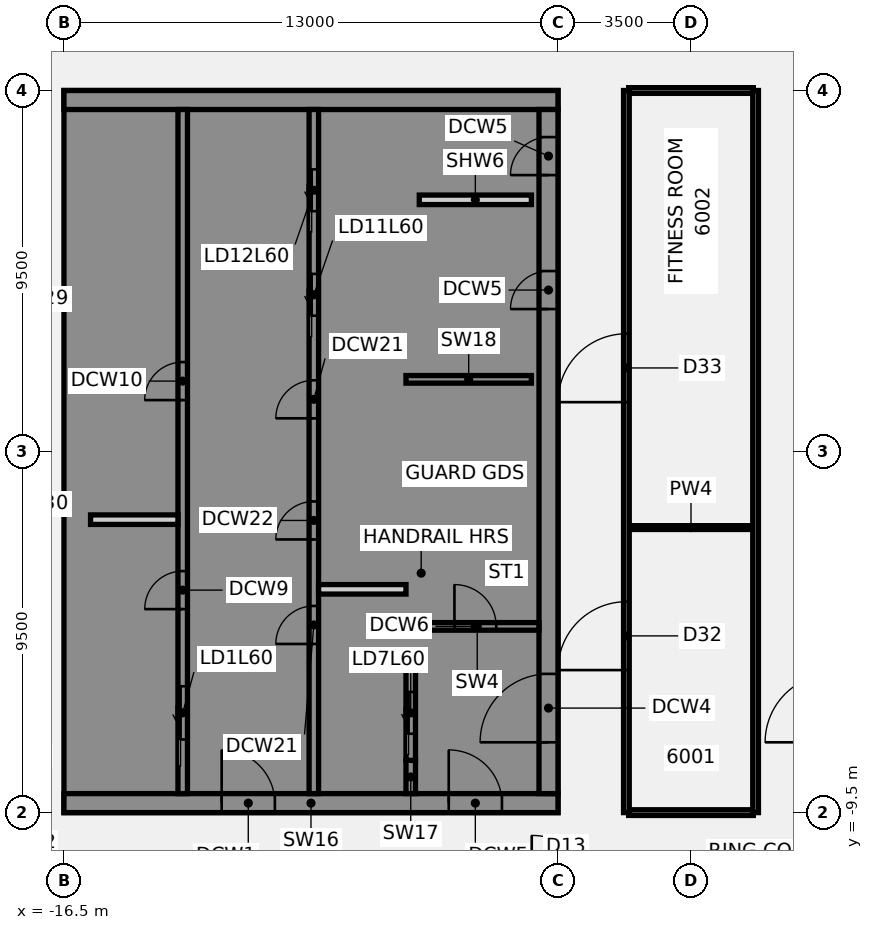
"""IFC4 building model, lengths in metres.
Left out: names, types, materials, properties, quantities, classifications, styles, units other than length and angle.
Written with IfcOpenShell. Run it as: python <this file> out.ifc"""

import sys

from ifc_helpers import new_model, si_unit, direction, frame, frame_2d, origin, place, context, subcontext, project, spatial, polyline, rectangle, outline, extrude, element, fill, save


model = new_model("IFC4")
c1 = context("Model", 3, precision=1e-05, world=origin(), true_north=direction((0.0, 1.0)))
c2 = subcontext(c1, "Body", "Model", "MODEL_VIEW")
j1 = project(units=[si_unit("LENGTHUNIT", "METRE"), si_unit("PLANEANGLEUNIT", "RADIAN")], contexts=[c1])
p1 = place(None, origin())
s1 = spatial("IfcSite", under=j1, at=p1, CompositionType="ELEMENT")
p2 = place(p1, origin())
s2 = spatial("IfcBuilding", under=s1, at=p2, CompositionType="ELEMENT")
p3 = place(p2, frame((0.0, 0.0, 237.9)))
s3 = spatial("IfcBuildingStorey", under=s2, at=p3, CompositionType="ELEMENT", Elevation=237.9)
p4 = place(p3, frame((-1.64, -9.5, 0.0), z_axis=(0.0, 0.0, 1.0), x_axis=(1.0, 0.0, 0.0)))
e1 = element("IfcWall", 1, at=p4, inside=s3, PredefinedType="PARTITIONING", context=c2, shape_type="SweptSolid", body=[
    extrude(rectangle(XDim=3.28, YDim=0.15, at=frame_2d((1.64, 0.0))), origin(), (0.0, 0.0, 1.0), 2.864),
])
p5 = place(p3, frame((-1.64, -2.0, 0.0), z_axis=(0.0, 0.0, 1.0), x_axis=(1.0, 0.0, 0.0)))
e2 = element("IfcWall", 2, at=p5, inside=s3, PredefinedType="PARTITIONING", context=c2, shape_type="SweptSolid", body=[
    extrude(rectangle(XDim=3.28, YDim=0.1, at=frame_2d((1.64, 0.0))), origin(), (0.0, 0.0, 1.0), 2.864),
])
p6 = place(p3, frame((-1.64, 9.5, 0.0), z_axis=(0.0, 0.0, 1.0), x_axis=(1.0, 0.0, 0.0)))
e3 = element("IfcWall", 3, at=p6, inside=s3, PredefinedType="PARTITIONING", context=c2, shape_type="SweptSolid", body=[
    extrude(rectangle(XDim=3.28, YDim=0.15, at=frame_2d((1.64, 0.0))), origin(), (0.0, 0.0, 1.0), 2.864),
])
p7 = place(p3, frame((-1.7, -9.5, 0.0), z_axis=(0.0, 0.0, 1.0), x_axis=(0.0, 1.0, 0.0)))
e4 = element("IfcWall", 4, at=p7, inside=s3, PredefinedType="PARTITIONING", context=c2, shape_type="SweptSolid", body=[
    extrude(rectangle(XDim=19.0, YDim=0.15, at=frame_2d((9.5, 0.0))), origin(), (0.0, 0.0, 1.0), 2.864),
])
p8 = place(p7, frame((3.75, 0.0, 0.0)))
e5 = element("IfcOpeningElement", 5, at=p8, cuts=e4, PredefinedType="OPENING", context=c2, shape_type="SweptSolid", body=[
    extrude(rectangle(XDim=1.8, YDim=2.1, at=frame_2d((0.9, 1.05))), frame((0.0, 0.085, 0.0), z_axis=(0.0, -1.0, 0.0), x_axis=(1.0, 0.0, 0.0)), (0.0, 0.0, 1.0), 0.17),
])
p9 = place(p7, frame((10.8, 0.0, 0.0)))
e6 = element("IfcOpeningElement", 6, at=p9, cuts=e4, PredefinedType="OPENING", context=c2, shape_type="SweptSolid", body=[
    extrude(rectangle(XDim=1.8, YDim=2.1, at=frame_2d((0.9, 1.05))), frame((0.0, 0.085, 0.0), z_axis=(0.0, -1.0, 0.0), x_axis=(1.0, 0.0, 0.0)), (0.0, 0.0, 1.0), 0.17),
])
p10 = place(p3, frame((1.7, -9.5, 0.0), z_axis=(0.0, 0.0, 1.0), x_axis=(0.0, 1.0, 0.0)))
e7 = element("IfcWall", 7, at=p10, inside=s3, PredefinedType="PARTITIONING", context=c2, shape_type="SweptSolid", body=[
    extrude(rectangle(XDim=19.0, YDim=0.15, at=frame_2d((9.5, 0.0))), origin(), (0.0, 0.0, 1.0), 2.864),
])
p11 = place(p3, frame((-16.5, -9.25, 0.0), z_axis=(0.0, 0.0, 1.0), x_axis=(1.0, 0.0, 0.0)))
e8 = element("IfcWall", 8, at=p11, inside=s3, PredefinedType="SHEAR", context=c2, shape_type="SweptSolid", body=[
    extrude(rectangle(XDim=13.0, YDim=0.5, at=frame_2d((6.5, 0.0))), origin(), (0.0, 0.0, 1.0), 3.46),
])
p12 = place(p11, frame((4.15, 0.0, 0.0)))
e9 = element("IfcOpeningElement", 9, at=p12, cuts=e8, PredefinedType="OPENING", context=c2, shape_type="SweptSolid", body=[
    extrude(rectangle(XDim=1.4, YDim=2.1, at=frame_2d((0.7, 1.05))), frame((0.0, 0.26, 0.0), z_axis=(0.0, -1.0, 0.0), x_axis=(1.0, 0.0, 0.0)), (0.0, 0.0, 1.0), 0.52),
])
p13 = place(p11, frame((10.125, 0.0, 0.0)))
e10 = element("IfcOpeningElement", 10, at=p13, cuts=e8, PredefinedType="OPENING", context=c2, shape_type="SweptSolid", body=[
    extrude(rectangle(XDim=1.4, YDim=2.1, at=frame_2d((0.7, 1.05))), frame((0.0, 0.26, 0.0), z_axis=(0.0, -1.0, 0.0), x_axis=(1.0, 0.0, 0.0)), (0.0, 0.0, 1.0), 0.52),
])
p14 = place(p3, origin())
e11 = element("IfcWall", 11, at=p14, inside=s3, PredefinedType="SHEAR", context=c2, shape_type="SweptSolid", body=[
    extrude(outline(polyline([(-13.5, -8.125), (-16.0, -8.125), (-16.0, -5.625), (-13.5, -5.625), (-13.5, -5.375), (-16.0, -5.375), (-16.0, 5.375), (-13.5, 5.375), (-13.5, 5.625), (-16.0, 5.625), (-16.0, 8.125), (-13.5, 8.125), (-13.5, 9.0), (-16.0, 9.0), (-16.5, 9.0), (-16.5, -9.0), (-16.0, -9.0), (-13.5, -9.0), (-13.5, -8.125)])), origin(), (0.0, 0.0, 1.0), 3.46),
])
p15 = place(p3, frame((-16.5, 9.25, 0.0), z_axis=(0.0, 0.0, 1.0), x_axis=(1.0, 0.0, 0.0)))
e12 = element("IfcWall", 12, at=p15, inside=s3, PredefinedType="SHEAR", context=c2, shape_type="SweptSolid", body=[
    extrude(rectangle(XDim=13.0, YDim=0.5, at=frame_2d((6.5, 0.0))), origin(), (0.0, 0.0, 1.0), 3.46),
])
p16 = place(p3, origin())
e13 = element("IfcWall", 13, at=p16, inside=s3, PredefinedType="SHEAR", context=c2, shape_type="SweptSolid", body=[
    extrude(outline(polyline([(-9.8, -5.375), (-9.8, -5.625), (-7.5, -5.625), (-7.25, -5.625), (-7.25, 9.0), (-7.5, 9.0), (-9.8, 9.0), (-9.8, 8.125), (-7.5, 8.125), (-7.5, 5.625), (-9.8, 5.625), (-9.8, 5.375), (-7.5, 5.375), (-7.5, 2.875), (-9.8, 2.875), (-9.8, 2.625), (-7.5, 2.625), (-7.5, -5.375), (-9.8, -5.375)])), origin(), (0.0, 0.0, 1.0), 3.46),
])
p17 = place(p3, origin())
e14 = element("IfcWall", 14, at=p17, inside=s3, PredefinedType="SHEAR", context=c2, shape_type="SweptSolid", body=[
    extrude(outline(polyline([(-7.5, -8.125), (-9.55, -8.125), (-9.55, -5.625), (-9.8, -5.625), (-9.8, -8.125), (-9.8, -9.0), (-7.5, -9.0), (-7.5, -8.125)])), origin(), (0.0, 0.0, 1.0), 3.46),
])
p18 = place(p3, frame((-7.375, -9.0, 0.0), z_axis=(0.0, 0.0, 1.0), x_axis=(0.0, 1.0, 0.0)))
e15 = element("IfcWall", 15, at=p18, inside=s3, PredefinedType="SHEAR", context=c2, shape_type="SweptSolid", body=[
    extrude(rectangle(XDim=0.875, YDim=0.25, at=frame_2d((0.438, 0.0))), origin(), (0.0, 0.0, 1.0), 3.46),
])
p19 = place(p3, frame((-7.5, 1.9, 0.0), z_axis=(0.0, 0.0, 1.0), x_axis=(1.0, 0.0, 0.0)))
e16 = element("IfcWall", 16, at=p19, inside=s3, PredefinedType="SHEAR", context=c2, shape_type="SweptSolid", body=[
    extrude(rectangle(XDim=3.3, YDim=0.2, at=frame_2d((1.65, 0.0))), origin(), (0.0, 0.0, 1.0), 3.46),
])
p20 = place(p3, frame((-13.375, -9.0, 0.0), z_axis=(0.0, 0.0, 1.0), x_axis=(0.0, 1.0, 0.0)))
e17 = element("IfcWall", 17, at=p20, inside=s3, PredefinedType="SHEAR", context=c2, shape_type="SweptSolid", body=[
    extrude(rectangle(XDim=18.0, YDim=0.25, at=frame_2d((9.0, 0.0))), origin(), (0.0, 0.0, 1.0), 3.46),
])
p21 = place(p20, frame((1.425, 0.0, 0.0)))
e18 = element("IfcOpeningElement", 18, at=p21, cuts=e17, PredefinedType="OPENING", context=c2, shape_type="SweptSolid", body=[
    extrude(rectangle(XDim=1.4, YDim=2.1, at=frame_2d((0.7, 1.05))), frame((0.0, 0.135, 0.0), z_axis=(0.0, -1.0, 0.0), x_axis=(1.0, 0.0, 0.0)), (0.0, 0.0, 1.0), 0.27),
])
p22 = place(p20, frame((4.854, 0.0, 0.0)))
e19 = element("IfcOpeningElement", 19, at=p22, cuts=e17, PredefinedType="OPENING", context=c2, shape_type="SweptSolid", body=[
    extrude(rectangle(XDim=1.0, YDim=2.1, at=frame_2d((0.5, 1.05))), frame((0.0, 0.135, 0.0), z_axis=(0.0, -1.0, 0.0), x_axis=(1.0, 0.0, 0.0)), (0.0, 0.0, 1.0), 0.27),
])
p23 = place(p20, frame((10.354, 0.0, 0.0)))
e20 = element("IfcOpeningElement", 20, at=p23, cuts=e17, PredefinedType="OPENING", context=c2, shape_type="SweptSolid", body=[
    extrude(rectangle(XDim=1.0, YDim=2.1, at=frame_2d((0.5, 1.05))), frame((0.0, 0.135, 0.0), z_axis=(0.0, -1.0, 0.0), x_axis=(1.0, 0.0, 0.0)), (0.0, 0.0, 1.0), 0.27),
])
p24 = place(p3, frame((-9.925, -9.0, 0.0), z_axis=(0.0, 0.0, 1.0), x_axis=(0.0, 1.0, 0.0)))
e21 = element("IfcWall", 21, at=p24, inside=s3, PredefinedType="SHEAR", context=c2, shape_type="SweptSolid", body=[
    extrude(rectangle(XDim=18.0, YDim=0.25, at=frame_2d((9.0, 0.0))), origin(), (0.0, 0.0, 1.0), 3.46),
])
p25 = place(p24, frame((12.575, 0.0, 0.0)))
e22 = element("IfcOpeningElement", 22, at=p25, cuts=e21, PredefinedType="OPENING", context=c2, shape_type="SweptSolid", body=[
    extrude(rectangle(XDim=1.1, YDim=2.1, at=frame_2d((0.55, 1.05))), frame((0.0, 0.135, 0.0), z_axis=(0.0, -1.0, 0.0), x_axis=(1.0, 0.0, 0.0)), (0.0, 0.0, 1.0), 0.27),
])
p26 = place(p24, frame((15.325, 0.0, 0.0)))
e23 = element("IfcOpeningElement", 23, at=p26, cuts=e21, PredefinedType="OPENING", context=c2, shape_type="SweptSolid", body=[
    extrude(rectangle(XDim=1.1, YDim=2.1, at=frame_2d((0.55, 1.05))), frame((0.0, 0.135, 0.0), z_axis=(0.0, -1.0, 0.0), x_axis=(1.0, 0.0, 0.0)), (0.0, 0.0, 1.0), 0.27),
])
p27 = place(p24, frame((3.938, 0.0, 0.0)))
e24 = element("IfcOpeningElement", 24, at=p27, cuts=e21, PredefinedType="OPENING", context=c2, shape_type="SweptSolid", body=[
    extrude(rectangle(XDim=1.0, YDim=2.1, at=frame_2d((0.5, 1.05))), frame((0.0, 0.135, 0.0), z_axis=(0.0, -1.0, 0.0), x_axis=(1.0, 0.0, 0.0)), (0.0, 0.0, 1.0), 0.27),
])
p28 = place(p24, frame((6.688, 0.0, 0.0)))
e25 = element("IfcOpeningElement", 25, at=p28, cuts=e21, PredefinedType="OPENING", context=c2, shape_type="SweptSolid", body=[
    extrude(rectangle(XDim=1.0, YDim=2.1, at=frame_2d((0.5, 1.05))), frame((0.0, 0.135, 0.0), z_axis=(0.0, -1.0, 0.0), x_axis=(1.0, 0.0, 0.0)), (0.0, 0.0, 1.0), 0.27),
])
p29 = place(p24, frame((9.875, 0.0, 0.0)))
e26 = element("IfcOpeningElement", 26, at=p29, cuts=e21, PredefinedType="OPENING", context=c2, shape_type="SweptSolid", body=[
    extrude(rectangle(XDim=1.0, YDim=2.1, at=frame_2d((0.5, 1.05))), frame((0.0, 0.135, 0.0), z_axis=(0.0, -1.0, 0.0), x_axis=(1.0, 0.0, 0.0)), (0.0, 0.0, 1.0), 0.27),
])
p30 = place(p3, frame((-7.375, -8.125, 0.0), z_axis=(0.0, 0.0, 1.0), x_axis=(0.0, 1.0, 0.0)))
e27 = element("IfcWall", 27, at=p30, inside=s3, PredefinedType="SHEAR", context=c2, shape_type="SweptSolid", body=[
    extrude(rectangle(XDim=2.5, YDim=0.25, at=frame_2d((1.25, 0.0))), origin(), (0.0, 0.0, 1.0), 3.46),
])
p31 = place(p30, frame((0.7, 0.0, 0.0)))
e28 = element("IfcOpeningElement", 28, at=p31, cuts=e27, PredefinedType="OPENING", context=c2, shape_type="SweptSolid", body=[
    extrude(rectangle(XDim=1.1, YDim=2.1, at=frame_2d((0.55, 1.05))), frame((0.0, 0.135, 0.0), z_axis=(0.0, -1.0, 0.0), x_axis=(1.0, 0.0, 0.0)), (0.0, 0.0, 1.0), 0.27),
])
p32 = place(p3, frame((-3.75, -9.0, 0.0), z_axis=(0.0, 0.0, 1.0), x_axis=(0.0, 1.0, 0.0)))
e29 = element("IfcWall", 29, at=p32, inside=s3, PredefinedType="SHEAR", context=c2, shape_type="SweptSolid", body=[
    extrude(rectangle(XDim=18.0, YDim=0.5, at=frame_2d((9.0, 0.0))), origin(), (0.0, 0.0, 1.0), 3.46),
])
p33 = place(p32, frame((1.35, 0.0, 0.0)))
e30 = element("IfcOpeningElement", 30, at=p33, cuts=e29, PredefinedType="OPENING", context=c2, shape_type="SweptSolid", body=[
    extrude(rectangle(XDim=1.8, YDim=2.1, at=frame_2d((0.9, 1.05))), frame((0.0, 0.26, 0.0), z_axis=(0.0, -1.0, 0.0), x_axis=(1.0, 0.0, 0.0)), (0.0, 0.0, 1.0), 0.52),
])
p34 = place(p32, frame((12.75, 0.0, 0.0)))
e31 = element("IfcOpeningElement", 31, at=p34, cuts=e29, PredefinedType="OPENING", context=c2, shape_type="SweptSolid", body=[
    extrude(rectangle(XDim=1.0, YDim=2.1, at=frame_2d((0.5, 1.05))), frame((0.0, 0.26, 0.0), z_axis=(0.0, -1.0, 0.0), x_axis=(1.0, 0.0, 0.0)), (0.0, 0.0, 1.0), 0.52),
])
p35 = place(p32, frame((16.274, 0.0, 0.0)))
e32 = element("IfcOpeningElement", 32, at=p35, cuts=e29, PredefinedType="OPENING", context=c2, shape_type="SweptSolid", body=[
    extrude(rectangle(XDim=1.0, YDim=2.1, at=frame_2d((0.5, 1.05))), frame((0.0, 0.26, 0.0), z_axis=(0.0, -1.0, 0.0), x_axis=(1.0, 0.0, 0.0)), (0.0, 0.0, 1.0), 0.52),
])
p36 = place(p3, frame((-7.15, 6.624, 0.0), z_axis=(0.0, 0.0, 1.0), x_axis=(1.0, 0.0, 0.0)))
e33 = element("IfcWall", 33, at=p36, inside=s3, PredefinedType="PARTITIONING", context=c2, shape_type="SweptSolid", body=[
    extrude(rectangle(XDim=2.95, YDim=0.25, at=frame_2d((1.475, 0.0))), origin(), (0.0, 0.0, 1.0), 3.46),
])
p37 = place(p3, frame((-7.25, -4.6, 0.0), z_axis=(0.0, 0.0, 1.0), x_axis=(1.0, 0.0, 0.0)))
e34 = element("IfcWall", 34, at=p37, inside=s3, PredefinedType="SHEAR", context=c2, shape_type="SweptSolid", body=[
    extrude(rectangle(XDim=3.25, YDim=0.2, at=frame_2d((1.625, 0.0))), origin(), (0.0, 0.0, 1.0), 3.46),
])
p38 = place(p37, frame((1.025, 0.0, 0.0)))
e35 = element("IfcOpeningElement", 35, at=p38, cuts=e34, PredefinedType="OPENING", context=c2, shape_type="SweptSolid", body=[
    extrude(rectangle(XDim=1.1, YDim=2.1, at=frame_2d((0.55, 1.05))), frame((0.0, 0.11, 0.0), z_axis=(0.0, -1.0, 0.0), x_axis=(1.0, 0.0, 0.0)), (0.0, 0.0, 1.0), 0.22),
])
for number, where, z_axis, x_axis in (
    (36, (-15.8, -1.792, 0.0), (0.0, 0.0, 1.0), (1.0, 0.0, 0.0)),
    (37, (-9.8, -3.625, 0.0), (0.0, 0.0, 1.0), (1.0, 0.0, 0.0)),
):
    element("IfcWall", number, at=place(p3, frame(where, z_axis=z_axis, x_axis=x_axis)), inside=s3, PredefinedType="PARTITIONING", context=c2, shape_type="SweptSolid", body=[
        extrude(rectangle(XDim=2.3, YDim=0.25, at=frame_2d((1.15, 0.0))), origin(), (0.0, 0.0, 1.0), 3.46),
    ])
p39 = place(p8, frame((1.8, 0.0, 0.0), z_axis=(0.0, 0.0, 1.0), x_axis=(-1.0, 0.0, 0.0)))
e38 = element("IfcDoor", 38, at=p39, inside=s3, OperationType="DOUBLE_DOOR_SINGLE_SWING", PredefinedType="DOOR", context=c2, shape_type="SweptSolid", body=[
    extrude(rectangle(XDim=1.8, YDim=2.1, at=frame_2d((0.9, 1.05))), frame((0.0, 0.025, 0.0), z_axis=(0.0, -1.0, 0.0), x_axis=(1.0, 0.0, 0.0)), (0.0, 0.0, 1.0), 0.05),
])
fill(e5, e38)
p40 = place(p9, frame((1.8, 0.0, 0.0), z_axis=(0.0, 0.0, 1.0), x_axis=(-1.0, 0.0, 0.0)))
e39 = element("IfcDoor", 39, at=p40, inside=s3, OperationType="DOUBLE_DOOR_SINGLE_SWING", PredefinedType="DOOR", context=c2, shape_type="SweptSolid", body=[
    extrude(rectangle(XDim=1.8, YDim=2.1, at=frame_2d((0.9, 1.05))), frame((0.0, 0.025, 0.0), z_axis=(0.0, -1.0, 0.0), x_axis=(1.0, 0.0, 0.0)), (0.0, 0.0, 1.0), 0.05),
])
fill(e6, e39)
p41 = place(p12, origin())
e40 = element("IfcDoor", 40, at=p41, inside=s3, OperationType="SINGLE_SWING_LEFT", PredefinedType="DOOR", context=c2, shape_type="SweptSolid", body=[
    extrude(rectangle(XDim=1.4, YDim=2.1, at=frame_2d((0.7, 1.05))), frame((0.0, 0.025, 0.0), z_axis=(0.0, -1.0, 0.0), x_axis=(1.0, 0.0, 0.0)), (0.0, 0.0, 1.0), 0.05),
])
fill(e9, e40)
p42 = place(p13, origin())
e41 = element("IfcDoor", 41, at=p42, inside=s3, OperationType="SINGLE_SWING_LEFT", PredefinedType="DOOR", context=c2, shape_type="SweptSolid", body=[
    extrude(rectangle(XDim=1.4, YDim=2.1, at=frame_2d((0.7, 1.05))), frame((0.0, 0.025, 0.0), z_axis=(0.0, -1.0, 0.0), x_axis=(1.0, 0.0, 0.0)), (0.0, 0.0, 1.0), 0.05),
])
fill(e10, e41)
p43 = place(p33, origin())
e42 = element("IfcDoor", 42, at=p43, inside=s3, OperationType="SINGLE_SWING_LEFT", PredefinedType="DOOR", context=c2, shape_type="SweptSolid", body=[
    extrude(rectangle(XDim=1.8, YDim=2.1, at=frame_2d((0.9, 1.05))), frame((0.0, 0.025, 0.0), z_axis=(0.0, -1.0, 0.0), x_axis=(1.0, 0.0, 0.0)), (0.0, 0.0, 1.0), 0.05),
])
fill(e30, e42)
p44 = place(p34, origin())
e43 = element("IfcDoor", 43, at=p44, inside=s3, OperationType="SINGLE_SWING_LEFT", PredefinedType="DOOR", context=c2, shape_type="SweptSolid", body=[
    extrude(rectangle(XDim=1.0, YDim=2.1, at=frame_2d((0.5, 1.05))), frame((0.0, 0.225, 0.0), z_axis=(0.0, -1.0, 0.0), x_axis=(1.0, 0.0, 0.0)), (0.0, 0.0, 1.0), 0.05),
])
fill(e31, e43)
p45 = place(p35, origin())
e44 = element("IfcDoor", 44, at=p45, inside=s3, OperationType="SINGLE_SWING_LEFT", PredefinedType="DOOR", context=c2, shape_type="SweptSolid", body=[
    extrude(rectangle(XDim=1.0, YDim=2.1, at=frame_2d((0.5, 1.05))), frame((0.0, 0.225, 0.0), z_axis=(0.0, -1.0, 0.0), x_axis=(1.0, 0.0, 0.0)), (0.0, 0.0, 1.0), 0.05),
])
fill(e32, e44)
p46 = place(p38, origin())
e45 = element("IfcDoor", 45, at=p46, inside=s3, OperationType="SINGLE_SWING_LEFT", PredefinedType="DOOR", context=c2, shape_type="SweptSolid", body=[
    extrude(rectangle(XDim=1.1, YDim=2.1, at=frame_2d((0.55, 1.05))), frame((0.0, 0.025, 0.0), z_axis=(0.0, -1.0, 0.0), x_axis=(1.0, 0.0, 0.0)), (0.0, 0.0, 1.0), 0.05),
])
fill(e35, e45)
p47 = place(p21, origin())
e46 = element("IfcDoor", 46, at=p47, inside=s3, OperationType="SLIDING_TO_LEFT", PredefinedType="DOOR", context=c2, shape_type="SweptSolid", body=[
    extrude(rectangle(XDim=1.4, YDim=2.1, at=frame_2d((0.7, 1.05))), frame((0.0, 0.025, 0.0), z_axis=(0.0, -1.0, 0.0), x_axis=(1.0, 0.0, 0.0)), (0.0, 0.0, 1.0), 0.05),
])
fill(e18, e46)
p48 = place(p31, origin())
e47 = element("IfcDoor", 47, at=p48, inside=s3, OperationType="SLIDING_TO_LEFT", PredefinedType="DOOR", context=c2, shape_type="SweptSolid", body=[
    extrude(rectangle(XDim=1.1, YDim=2.1, at=frame_2d((0.55, 1.05))), frame((0.0, 0.025, 0.0), z_axis=(0.0, -1.0, 0.0), x_axis=(1.0, 0.0, 0.0)), (0.0, 0.0, 1.0), 0.05),
])
fill(e28, e47)
p49 = place(p25, origin())
e48 = element("IfcDoor", 48, at=p49, inside=s3, OperationType="SLIDING_TO_LEFT", PredefinedType="DOOR", context=c2, shape_type="SweptSolid", body=[
    extrude(rectangle(XDim=1.1, YDim=2.1, at=frame_2d((0.55, 1.05))), frame((0.0, 0.025, 0.0), z_axis=(0.0, -1.0, 0.0), x_axis=(1.0, 0.0, 0.0)), (0.0, 0.0, 1.0), 0.05),
])
fill(e22, e48)
p50 = place(p26, origin())
e49 = element("IfcDoor", 49, at=p50, inside=s3, OperationType="SLIDING_TO_LEFT", PredefinedType="DOOR", context=c2, shape_type="SweptSolid", body=[
    extrude(rectangle(XDim=1.1, YDim=2.1, at=frame_2d((0.55, 1.05))), frame((0.0, 0.025, 0.0), z_axis=(0.0, -1.0, 0.0), x_axis=(1.0, 0.0, 0.0)), (0.0, 0.0, 1.0), 0.05),
])
fill(e23, e49)
p51 = place(p22, origin())
e50 = element("IfcDoor", 50, at=p51, inside=s3, OperationType="SINGLE_SWING_LEFT", PredefinedType="DOOR", context=c2, shape_type="SweptSolid", body=[
    extrude(rectangle(XDim=1.0, YDim=2.1, at=frame_2d((0.5, 1.05))), frame((0.0, 0.025, 0.0), z_axis=(0.0, -1.0, 0.0), x_axis=(1.0, 0.0, 0.0)), (0.0, 0.0, 1.0), 0.05),
])
fill(e19, e50)
p52 = place(p23, origin())
e51 = element("IfcDoor", 51, at=p52, inside=s3, OperationType="SINGLE_SWING_LEFT", PredefinedType="DOOR", context=c2, shape_type="SweptSolid", body=[
    extrude(rectangle(XDim=1.0, YDim=2.1, at=frame_2d((0.5, 1.05))), frame((0.0, 0.025, 0.0), z_axis=(0.0, -1.0, 0.0), x_axis=(1.0, 0.0, 0.0)), (0.0, 0.0, 1.0), 0.05),
])
fill(e20, e51)
p53 = place(p27, origin())
e52 = element("IfcDoor", 52, at=p53, inside=s3, OperationType="SINGLE_SWING_LEFT", PredefinedType="DOOR", context=c2, shape_type="SweptSolid", body=[
    extrude(rectangle(XDim=1.0, YDim=2.1, at=frame_2d((0.5, 1.05))), frame((0.0, 0.025, 0.0), z_axis=(0.0, -1.0, 0.0), x_axis=(1.0, 0.0, 0.0)), (0.0, 0.0, 1.0), 0.05),
])
fill(e24, e52)
p54 = place(p28, origin())
e53 = element("IfcDoor", 53, at=p54, inside=s3, OperationType="SINGLE_SWING_LEFT", PredefinedType="DOOR", context=c2, shape_type="SweptSolid", body=[
    extrude(rectangle(XDim=1.0, YDim=2.1, at=frame_2d((0.5, 1.05))), frame((0.0, 0.025, 0.0), z_axis=(0.0, -1.0, 0.0), x_axis=(1.0, 0.0, 0.0)), (0.0, 0.0, 1.0), 0.05),
])
fill(e25, e53)
p55 = place(p29, origin())
e54 = element("IfcDoor", 54, at=p55, inside=s3, OperationType="SINGLE_SWING_LEFT", PredefinedType="DOOR", context=c2, shape_type="SweptSolid", body=[
    extrude(rectangle(XDim=1.0, YDim=2.1, at=frame_2d((0.5, 1.05))), frame((0.0, 0.025, 0.0), z_axis=(0.0, -1.0, 0.0), x_axis=(1.0, 0.0, 0.0)), (0.0, 0.0, 1.0), 0.05),
])
fill(e26, e54)
save(model, sys.argv[1])
